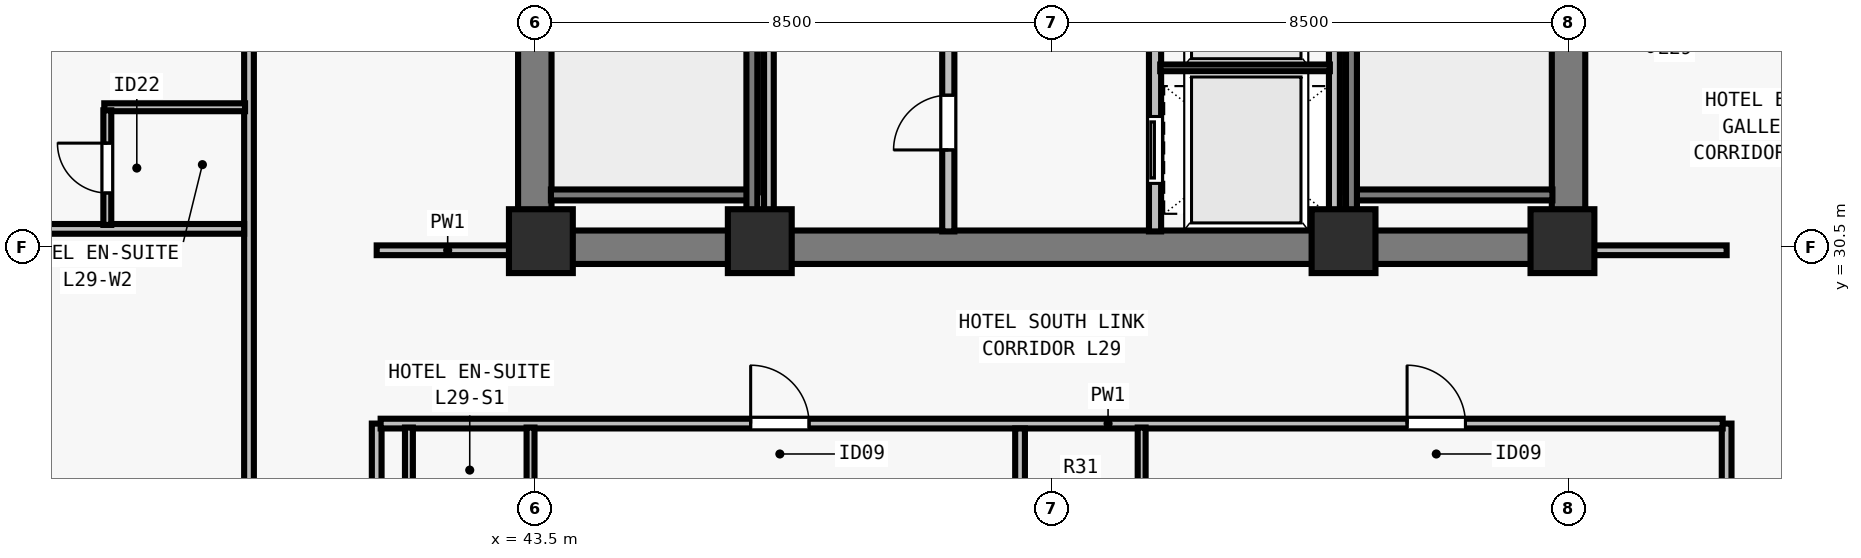
"""IFC4 building model, lengths in metres.
Left out: names, types, materials, properties, quantities, classifications, styles, units other than length and angle.
Written with IfcOpenShell. Run it as: python <this file> out.ifc"""

import sys

from ifc_helpers import new_model, si_unit, direction, frame, frame_2d, origin, origin_2d, place, context, subcontext, project, spatial, rectangle, extrude, element, fill, save


model = new_model("IFC4")
c1 = context("Model", 3, precision=1e-05, world=origin(), true_north=direction((0.0, 1.0)))
c2 = subcontext(c1, "Body", "Model", "MODEL_VIEW")
j1 = project(units=[si_unit("LENGTHUNIT", "METRE"), si_unit("PLANEANGLEUNIT", "RADIAN")], contexts=[c1])
p1 = place(None, origin())
s1 = spatial("IfcSite", under=j1, at=p1, CompositionType="ELEMENT")
p2 = place(p1, origin())
s2 = spatial("IfcBuilding", under=s1, at=p2, CompositionType="ELEMENT")
p3 = place(p2, frame((0.0, 0.0, 109.5)))
s3 = spatial("IfcBuildingStorey", under=s2, at=p3, CompositionType="ELEMENT", Elevation=109.5)
for number, where, z_axis, x_axis in (
    (1, (43.6, 30.6, 0.0), (0.0, 0.0, 1.0), (1.0, 0.0, 0.0)),
    (2, (47.2, 30.6, 0.0), (0.0, 0.0, 1.0), (1.0, 0.0, 0.0)),
    (3, (56.8, 30.6, 0.0), (0.0, 0.0, 1.0), (1.0, 0.0, 0.0)),
    (4, (60.4, 30.6, 0.0), (0.0, 0.0, 1.0), (1.0, 0.0, 0.0)),
):
    element("IfcColumn", number, at=place(p3, frame(where, z_axis=z_axis, x_axis=x_axis)), inside=s3, PredefinedType="COLUMN", context=c2, shape_type="SweptSolid", body=[
        extrude(rectangle(XDim=1.05, YDim=1.05, at=origin_2d()), origin(), (0.0, 0.0, 1.0), 3.5),
    ])
p4 = place(p3, frame((43.225, 30.5, 0.0), z_axis=(0.0, 0.0, 1.0), x_axis=(1.0, 0.0, 0.0)))
e5 = element("IfcWall", 5, at=p4, inside=s3, PredefinedType="SHEAR", context=c2, shape_type="SweptSolid", body=[
    extrude(rectangle(XDim=17.55, YDim=0.55, at=frame_2d((8.775, 0.0))), origin(), (0.0, 0.0, 1.0), 3.28),
])
for number, where, z_axis, x_axis in (
    (6, (43.5, 30.765, 0.0), (0.0, 0.0, 1.0), (0.0, 1.0, 0.0)),
    (7, (60.5, 30.765, 0.0), (0.0, 0.0, 1.0), (0.0, 1.0, 0.0)),
):
    element("IfcWall", number, at=place(p3, frame(where, z_axis=z_axis, x_axis=x_axis)), inside=s3, PredefinedType="SHEAR", context=c2, shape_type="SweptSolid", body=[
        extrude(rectangle(XDim=7.985, YDim=0.55, at=frame_2d((3.993, 0.0))), origin(), (0.0, 0.0, 1.0), 3.28),
    ])
p5 = place(p3, frame((50.3, 30.76, 0.0), z_axis=(0.0, 0.0, 1.0), x_axis=(0.0, 1.0, 0.0)))
e8 = element("IfcWall", 8, at=p5, inside=s3, PredefinedType="SOLIDWALL", context=c2, shape_type="SweptSolid", body=[
    extrude(rectangle(XDim=7.855, YDim=0.2, at=frame_2d((3.927, 0.0))), origin(), (0.0, 0.0, 1.0), 3.28),
])
p6 = place(p5, frame((1.34, 0.0, 0.0)))
e9 = element("IfcOpeningElement", 9, at=p6, cuts=e8, PredefinedType="OPENING", context=c2, shape_type="SweptSolid", body=[
    extrude(rectangle(XDim=0.9, YDim=2.12, at=frame_2d((0.45, 1.06))), frame((0.0, 0.11, 0.0), z_axis=(0.0, -1.0, 0.0), x_axis=(1.0, 0.0, 0.0)), (0.0, 0.0, 1.0), 0.22),
])
p7 = place(p5, frame((5.34, 0.0, 0.0)))
e10 = element("IfcOpeningElement", 10, at=p7, cuts=e8, PredefinedType="OPENING", context=c2, shape_type="SweptSolid", body=[
    extrude(rectangle(XDim=0.9, YDim=2.12, at=frame_2d((0.45, 1.06))), frame((0.0, 0.11, 0.0), z_axis=(0.0, -1.0, 0.0), x_axis=(1.0, 0.0, 0.0)), (0.0, 0.0, 1.0), 0.22),
])
p8 = place(p3, frame((53.7, 30.76, 0.0), z_axis=(0.0, 0.0, 1.0), x_axis=(0.0, 1.0, 0.0)))
e11 = element("IfcWall", 11, at=p8, inside=s3, PredefinedType="SOLIDWALL", context=c2, shape_type="SweptSolid", body=[
    extrude(rectangle(XDim=7.855, YDim=0.2, at=frame_2d((3.927, 0.0))), origin(), (0.0, 0.0, 1.0), 3.28),
])
p9 = place(p8, frame((0.79, 0.0, 0.0)))
e12 = element("IfcOpeningElement", 12, at=p9, cuts=e11, PredefinedType="OPENING", context=c2, shape_type="SweptSolid", body=[
    extrude(rectangle(XDim=1.1, YDim=2.2, at=frame_2d((0.55, 1.1))), frame((0.0, 0.11, 0.0), z_axis=(0.0, -1.0, 0.0), x_axis=(1.0, 0.0, 0.0)), (0.0, 0.0, 1.0), 0.22),
])
p10 = place(p8, frame((3.49, 0.0, 0.0)))
e13 = element("IfcOpeningElement", 13, at=p10, cuts=e11, PredefinedType="OPENING", context=c2, shape_type="SweptSolid", body=[
    extrude(rectangle(XDim=1.1, YDim=2.2, at=frame_2d((0.55, 1.1))), frame((0.0, 0.11, 0.0), z_axis=(0.0, -1.0, 0.0), x_axis=(1.0, 0.0, 0.0)), (0.0, 0.0, 1.0), 0.22),
])
p11 = place(p8, frame((6.19, 0.0, 0.0)))
e14 = element("IfcOpeningElement", 14, at=p11, cuts=e11, PredefinedType="OPENING", context=c2, shape_type="SweptSolid", body=[
    extrude(rectangle(XDim=1.1, YDim=2.2, at=frame_2d((0.55, 1.1))), frame((0.0, 0.11, 0.0), z_axis=(0.0, -1.0, 0.0), x_axis=(1.0, 0.0, 0.0)), (0.0, 0.0, 1.0), 0.22),
])
p12 = place(p3, frame((47.35, 30.76, 0.0), z_axis=(0.0, 0.0, 1.0), x_axis=(0.0, 1.0, 0.0)))
e15 = element("IfcWall", 15, at=p12, inside=s3, PredefinedType="PARTITIONING", context=c2, shape_type="SweptSolid", body=[
    extrude(rectangle(XDim=7.855, YDim=0.16, at=frame_2d((3.927, 0.0))), origin(), (0.0, 0.0, 1.0), 3.28),
])
p13 = place(p3, frame((56.65, 30.76, 0.0), z_axis=(0.0, 0.0, 1.0), x_axis=(0.0, 1.0, 0.0)))
e16 = element("IfcWall", 16, at=p13, inside=s3, PredefinedType="SOLIDWALL", context=c2, shape_type="SweptSolid", body=[
    extrude(rectangle(XDim=7.855, YDim=0.18, at=frame_2d((3.927, 0.0))), origin(), (0.0, 0.0, 1.0), 3.28),
])
p14 = place(p3, frame((53.785, 33.45, 0.0), z_axis=(0.0, 0.0, 1.0), x_axis=(1.0, 0.0, 0.0)))
e17 = element("IfcWall", 17, at=p14, inside=s3, PredefinedType="PARTITIONING", context=c2, shape_type="SweptSolid", body=[
    extrude(rectangle(XDim=2.79, YDim=0.11, at=frame_2d((1.395, 0.0))), origin(), (0.0, 0.0, 1.0), 3.28),
])
p15 = place(p3, frame((38.8, 15.325, 0.0), z_axis=(0.0, 0.0, 1.0), x_axis=(0.0, 1.0, 0.0)))
e18 = element("IfcWall", 18, at=p15, inside=s3, PredefinedType="PARTITIONING", context=c2, shape_type="SweptSolid", body=[
    extrude(rectangle(XDim=47.35, YDim=0.16, at=frame_2d((23.675, 0.0))), origin(), (0.0, 0.0, 1.0), 2.555),
])
p16 = place(p15, frame((8.606, 0.0, 0.0)))
e19 = element("IfcOpeningElement", 19, at=p16, cuts=e18, PredefinedType="OPENING", context=c2, shape_type="SweptSolid", body=[
    extrude(rectangle(XDim=0.96, YDim=2.15, at=frame_2d((0.48, 1.075))), frame((0.0, 0.09, 0.0), z_axis=(0.0, -1.0, 0.0), x_axis=(1.0, 0.0, 0.0)), (0.0, 0.0, 1.0), 0.18),
])
p17 = place(p15, frame((24.218, 0.0, 0.0)))
e20 = element("IfcOpeningElement", 20, at=p17, cuts=e18, PredefinedType="OPENING", context=c2, shape_type="SweptSolid", body=[
    extrude(rectangle(XDim=0.96, YDim=2.15, at=frame_2d((0.48, 1.075))), frame((0.0, 0.09, 0.0), z_axis=(0.0, -1.0, 0.0), x_axis=(1.0, 0.0, 0.0)), (0.0, 0.0, 1.0), 0.18),
])
p18 = place(p15, frame((40.107, 0.0, 0.0)))
e21 = element("IfcOpeningElement", 21, at=p18, cuts=e18, PredefinedType="OPENING", context=c2, shape_type="SweptSolid", body=[
    extrude(rectangle(XDim=0.96, YDim=2.15, at=frame_2d((0.48, 1.075))), frame((0.0, 0.09, 0.0), z_axis=(0.0, -1.0, 0.0), x_axis=(1.0, 0.0, 0.0)), (0.0, 0.0, 1.0), 0.18),
])
p19 = place(p3, frame((40.9, 15.325, 0.0), z_axis=(0.0, 0.0, 1.0), x_axis=(0.0, 1.0, 0.0)))
e22 = element("IfcWall", 22, at=p19, inside=s3, PredefinedType="PARTITIONING", context=c2, shape_type="SweptSolid", body=[
    extrude(rectangle(XDim=12.275, YDim=0.16, at=frame_2d((6.138, 0.0))), origin(), (0.0, 0.0, 1.0), 2.555),
])
p20 = place(p3, frame((40.9, 30.45, 0.0), z_axis=(0.0, 0.0, 1.0), x_axis=(1.0, 0.0, 0.0)))
e23 = element("IfcWall", 23, at=p20, inside=s3, PredefinedType="PARTITIONING", context=c2, shape_type="SweptSolid", body=[
    extrude(rectangle(XDim=2.335, YDim=0.16, at=frame_2d((1.167, 0.0))), origin(), (0.0, 0.0, 1.0), 3.28),
])
p21 = place(p3, frame((63.1, 15.325, 0.0), z_axis=(0.0, 0.0, 1.0), x_axis=(0.0, 1.0, 0.0)))
e24 = element("IfcWall", 24, at=p21, inside=s3, PredefinedType="PARTITIONING", context=c2, shape_type="SweptSolid", body=[
    extrude(rectangle(XDim=12.275, YDim=0.16, at=frame_2d((6.138, 0.0))), origin(), (0.0, 0.0, 1.0), 2.555),
])
p22 = place(p3, frame((60.765, 30.45, 0.0), z_axis=(0.0, 0.0, 1.0), x_axis=(1.0, 0.0, 0.0)))
e25 = element("IfcWall", 25, at=p22, inside=s3, PredefinedType="PARTITIONING", context=c2, shape_type="SweptSolid", body=[
    extrude(rectangle(XDim=2.335, YDim=0.16, at=frame_2d((1.167, 0.0))), origin(), (0.0, 0.0, 1.0), 3.28),
])
p23 = place(p3, frame((40.965, 27.6, 0.0), z_axis=(0.0, 0.0, 1.0), x_axis=(1.0, 0.0, 0.0)))
e26 = element("IfcWall", 26, at=p23, inside=s3, PredefinedType="PARTITIONING", context=c2, shape_type="SweptSolid", body=[
    extrude(rectangle(XDim=22.07, YDim=0.16, at=frame_2d((11.035, 0.0))), origin(), (0.0, 0.0, 1.0), 3.28),
])
p24 = place(p23, frame((6.085, 0.0, 0.0)))
e27 = element("IfcOpeningElement", 27, at=p24, cuts=e26, PredefinedType="OPENING", context=c2, shape_type="SweptSolid", body=[
    extrude(rectangle(XDim=0.96, YDim=2.15, at=frame_2d((0.48, 1.075))), frame((0.0, 0.09, 0.0), z_axis=(0.0, -1.0, 0.0), x_axis=(1.0, 0.0, 0.0)), (0.0, 0.0, 1.0), 0.18),
])
p25 = place(p23, frame((16.88, 0.0, 0.0)))
e28 = element("IfcOpeningElement", 28, at=p25, cuts=e26, PredefinedType="OPENING", context=c2, shape_type="SweptSolid", body=[
    extrude(rectangle(XDim=0.96, YDim=2.15, at=frame_2d((0.48, 1.075))), frame((0.0, 0.09, 0.0), z_axis=(0.0, -1.0, 0.0), x_axis=(1.0, 0.0, 0.0)), (0.0, 0.0, 1.0), 0.18),
])
for number, where, z_axis, x_axis in (
    (29, (41.43, 25.22, 0.0), (0.0, 0.0, 1.0), (0.0, 1.0, 0.0)),
    (30, (43.43, 25.22, 0.0), (0.0, 0.0, 1.0), (0.0, 1.0, 0.0)),
):
    element("IfcWall", number, at=place(p3, frame(where, z_axis=z_axis, x_axis=x_axis)), inside=s3, PredefinedType="PLUMBINGWALL", context=c2, shape_type="SweptSolid", body=[
        extrude(rectangle(XDim=2.315, YDim=0.13, at=frame_2d((1.157, 0.0))), origin(), (0.0, 0.0, 1.0), 3.28),
    ])
p26 = place(p3, frame((51.48, 15.325, 0.0), z_axis=(0.0, 0.0, 1.0), x_axis=(0.0, 1.0, 0.0)))
e31 = element("IfcWall", 31, at=p26, inside=s3, PredefinedType="PARTITIONING", context=c2, shape_type="SweptSolid", body=[
    extrude(rectangle(XDim=12.195, YDim=0.16, at=frame_2d((6.098, 0.0))), origin(), (0.0, 0.0, 1.0), 2.896),
])
p27 = place(p3, frame((53.48, 25.22, 0.0), z_axis=(0.0, 0.0, 1.0), x_axis=(0.0, 1.0, 0.0)))
e32 = element("IfcWall", 32, at=p27, inside=s3, PredefinedType="PLUMBINGWALL", context=c2, shape_type="SweptSolid", body=[
    extrude(rectangle(XDim=2.315, YDim=0.13, at=frame_2d((1.157, 0.0))), origin(), (0.0, 0.0, 1.0), 2.896),
])
p28 = place(p3, frame((28.325, 30.802, 0.0), z_axis=(0.0, 0.0, 1.0), x_axis=(1.0, 0.0, 0.0)))
e33 = element("IfcWall", 33, at=p28, inside=s3, PredefinedType="PARTITIONING", context=c2, shape_type="SweptSolid", body=[
    extrude(rectangle(XDim=10.395, YDim=0.16, at=frame_2d((5.198, 0.0))), origin(), (0.0, 0.0, 1.0), 3.28),
])
p29 = place(p3, frame((36.42, 32.802, 0.0), z_axis=(0.0, 0.0, 1.0), x_axis=(1.0, 0.0, 0.0)))
e34 = element("IfcWall", 34, at=p29, inside=s3, PredefinedType="PLUMBINGWALL", context=c2, shape_type="SweptSolid", body=[
    extrude(rectangle(XDim=2.315, YDim=0.13, at=frame_2d((1.158, 0.0))), origin(), (0.0, 0.0, 1.0), 3.28),
])
p30 = place(p3, frame((36.47, 30.867, 0.0), z_axis=(0.0, 0.0, 1.0), x_axis=(0.0, 1.0, 0.0)))
e35 = element("IfcWall", 35, at=p30, inside=s3, PredefinedType="PLUMBINGWALL", context=c2, shape_type="SweptSolid", body=[
    extrude(rectangle(XDim=1.885, YDim=0.13, at=frame_2d((0.942, 0.0))), origin(), (0.0, 0.0, 1.0), 3.28),
])
p31 = place(p30, frame((0.525, 0.0, 0.0)))
e36 = element("IfcOpeningElement", 36, at=p31, cuts=e35, PredefinedType="OPENING", context=c2, shape_type="SweptSolid", body=[
    extrude(rectangle(XDim=0.82, YDim=2.1, at=frame_2d((0.41, 1.05))), frame((0.0, 0.075, 0.0), z_axis=(0.0, -1.0, 0.0), x_axis=(1.0, 0.0, 0.0)), (0.0, 0.0, 1.0), 0.15),
])
p32 = place(p3, frame((43.765, 31.36, 0.0), z_axis=(0.0, 0.0, 1.0), x_axis=(1.0, 0.0, 0.0)))
e37 = element("IfcWall", 37, at=p32, inside=s3, PredefinedType="SOLIDWALL", context=c2, shape_type="SweptSolid", body=[
    extrude(rectangle(XDim=3.23, YDim=0.18, at=frame_2d((1.615, 0.0))), origin(), (0.0, 0.0, 1.0), 3.28),
])
p33 = place(p3, frame((47.07, 38.78, 0.0), z_axis=(0.0, 0.0, 1.0), x_axis=(0.0, -1.0, 0.0)))
e38 = element("IfcWall", 38, at=p33, inside=s3, PredefinedType="SOLIDWALL", context=c2, shape_type="SweptSolid", body=[
    extrude(rectangle(XDim=8.017, YDim=0.18, at=frame_2d((4.009, 0.0))), origin(), (0.0, 0.0, 1.0), 3.28),
])
p34 = place(p3, frame((57.005, 31.36, 0.0), z_axis=(0.0, 0.0, 1.0), x_axis=(1.0, 0.0, 0.0)))
e39 = element("IfcWall", 39, at=p34, inside=s3, PredefinedType="SOLIDWALL", context=c2, shape_type="SweptSolid", body=[
    extrude(rectangle(XDim=3.23, YDim=0.18, at=frame_2d((1.615, 0.0))), origin(), (0.0, 0.0, 1.0), 3.28),
])
p35 = place(p3, frame((56.93, 38.78, 0.0), z_axis=(0.0, 0.0, 1.0), x_axis=(0.0, -1.0, 0.0)))
e40 = element("IfcWall", 40, at=p35, inside=s3, PredefinedType="SOLIDWALL", context=c2, shape_type="SweptSolid", body=[
    extrude(rectangle(XDim=8.017, YDim=0.18, at=frame_2d((4.009, 0.0))), origin(), (0.0, 0.0, 1.0), 3.28),
])
p36 = place(p6, origin())
e41 = element("IfcDoor", 41, at=p36, inside=s3, OperationType="SINGLE_SWING_LEFT", PredefinedType="DOOR", context=c2, shape_type="SweptSolid", body=[
    extrude(rectangle(XDim=0.9, YDim=2.12, at=frame_2d((0.45, 1.06))), frame((0.0, 0.025, 0.0), z_axis=(0.0, -1.0, 0.0), x_axis=(1.0, 0.0, 0.0)), (0.0, 0.0, 1.0), 0.05),
])
fill(e9, e41)
p37 = place(p9, origin())
e42 = element("IfcDoor", 42, at=p37, inside=s3, OperationType="SLIDING_TO_LEFT", PredefinedType="DOOR", context=c2, shape_type="SweptSolid", body=[
    extrude(rectangle(XDim=1.1, YDim=2.2, at=frame_2d((0.55, 1.1))), frame((0.0, 0.025, 0.0), z_axis=(0.0, -1.0, 0.0), x_axis=(1.0, 0.0, 0.0)), (0.0, 0.0, 1.0), 0.05),
])
fill(e12, e42)
p38 = place(p24, origin())
e43 = element("IfcDoor", 43, at=p38, inside=s3, OperationType="SINGLE_SWING_LEFT", PredefinedType="DOOR", context=c2, shape_type="SweptSolid", body=[
    extrude(rectangle(XDim=0.96, YDim=2.15, at=frame_2d((0.48, 1.075))), frame((0.0, 0.025, 0.0), z_axis=(0.0, -1.0, 0.0), x_axis=(1.0, 0.0, 0.0)), (0.0, 0.0, 1.0), 0.05),
])
fill(e27, e43)
p39 = place(p25, origin())
e44 = element("IfcDoor", 44, at=p39, inside=s3, OperationType="SINGLE_SWING_LEFT", PredefinedType="DOOR", context=c2, shape_type="SweptSolid", body=[
    extrude(rectangle(XDim=0.96, YDim=2.15, at=frame_2d((0.48, 1.075))), frame((0.0, 0.025, 0.0), z_axis=(0.0, -1.0, 0.0), x_axis=(1.0, 0.0, 0.0)), (0.0, 0.0, 1.0), 0.05),
])
fill(e28, e44)
p40 = place(p31, origin())
e45 = element("IfcDoor", 45, at=p40, inside=s3, OperationType="SINGLE_SWING_RIGHT", PredefinedType="DOOR", context=c2, shape_type="SweptSolid", body=[
    extrude(rectangle(XDim=0.82, YDim=2.1, at=frame_2d((0.41, 1.05))), frame((0.0, 0.025, 0.0), z_axis=(0.0, -1.0, 0.0), x_axis=(1.0, 0.0, 0.0)), (0.0, 0.0, 1.0), 0.05),
])
fill(e36, e45)
save(model, sys.argv[1])
